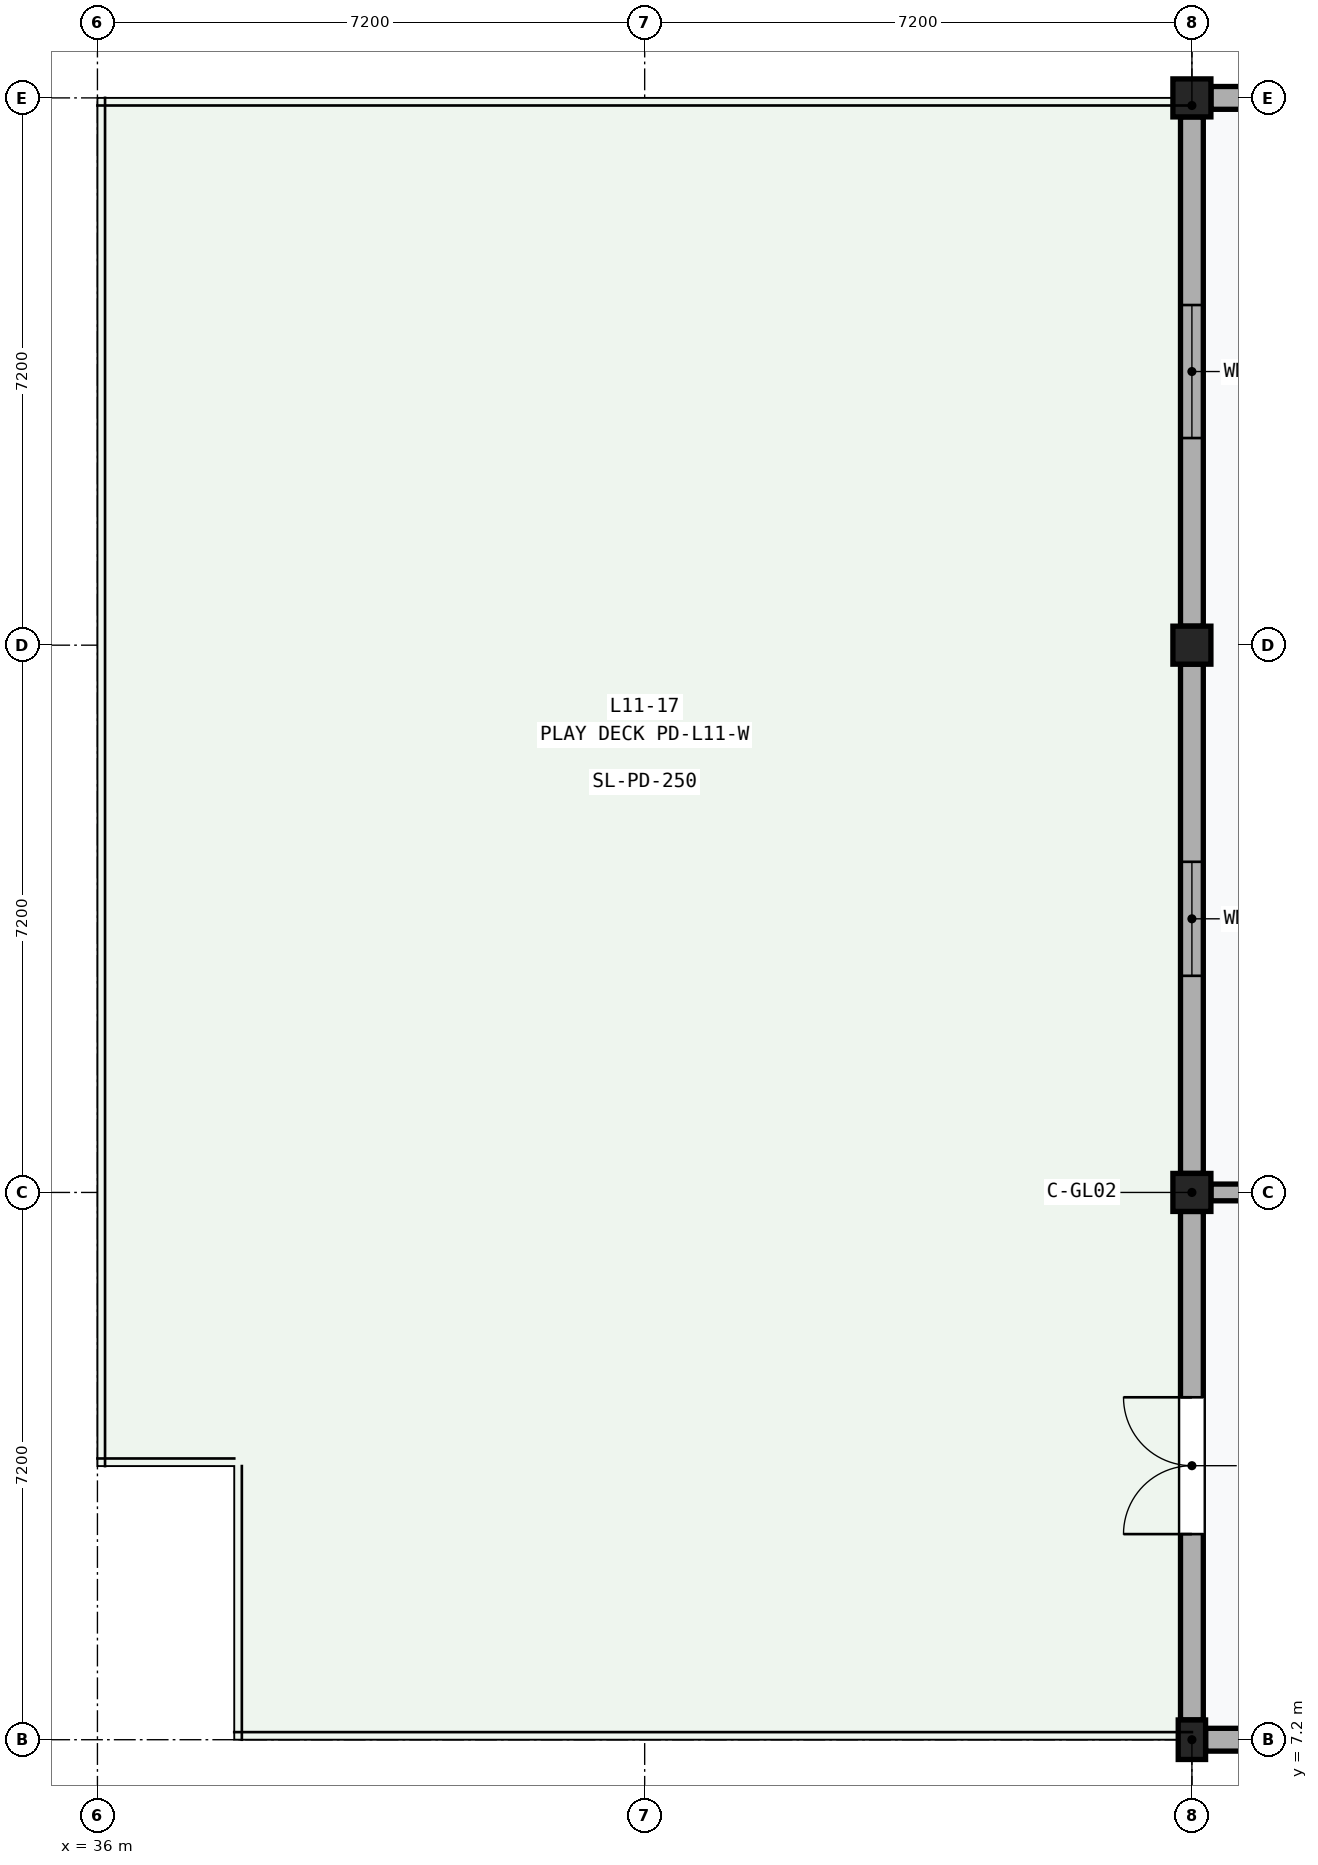
"""IFC4 building model, lengths in metres.
Left out: names, types, materials, properties, quantities, classifications, styles, units other than length and angle.
Written with IfcOpenShell. Run it as: python <this file> out.ifc"""

import sys

from ifc_helpers import new_model, si_unit, direction, frame, frame_2d, origin, origin_2d, place, context, subcontext, project, spatial, rectangle, extrude, element, fill, save


model = new_model("IFC4")
c1 = context("Model", 3, precision=1e-05, world=origin(), true_north=direction((0.0, 1.0)))
c2 = subcontext(c1, "Body", "Model", "MODEL_VIEW")
j1 = project(units=[si_unit("LENGTHUNIT", "METRE"), si_unit("PLANEANGLEUNIT", "RADIAN")], contexts=[c1])
p1 = place(None, origin())
s1 = spatial("IfcSite", under=j1, at=p1, CompositionType="ELEMENT")
p2 = place(p1, origin())
s2 = spatial("IfcBuilding", under=s1, at=p2, CompositionType="ELEMENT")
p3 = place(p2, frame((0.0, 0.0, 46.8)))
s3 = spatial("IfcBuildingStorey", under=s2, at=p3, CompositionType="ELEMENT", Elevation=46.8)
p4 = place(p3, frame((50.4, 7.2, 0.0), z_axis=(0.0, 0.0, 1.0), x_axis=(1.0, 0.0, 0.0)))
e1 = element("IfcColumn", 1, at=p4, inside=s3, PredefinedType="PILASTER", context=c2, shape_type="SweptSolid", body=[
    extrude(rectangle(XDim=0.36, YDim=0.52, at=origin_2d()), origin(), (0.0, 0.0, 1.0), 4.2),
])
for number, where, z_axis, x_axis in (
    (2, (50.4, 14.4, 0.0), (0.0, 0.0, 1.0), (1.0, 0.0, 0.0)),
    (3, (50.4, 21.6, 0.0), (0.0, 0.0, 1.0), (1.0, 0.0, 0.0)),
    (4, (50.4, 28.8, 0.0), (0.0, 0.0, 1.0), (1.0, 0.0, 0.0)),
):
    element("IfcColumn", number, at=place(p3, frame(where, z_axis=z_axis, x_axis=x_axis)), inside=s3, PredefinedType="COLUMN", context=c2, shape_type="SweptSolid", body=[
        extrude(rectangle(XDim=0.5, YDim=0.5, at=origin_2d()), origin(), (0.0, 0.0, 1.0), 4.2),
    ])
p5 = place(p3, frame((50.58, 7.2, 0.0), z_axis=(0.0, 0.0, 1.0), x_axis=(1.0, 0.0, 0.0)))
e5 = element("IfcWall", 5, at=p5, inside=s3, PredefinedType="SOLIDWALL", context=c2, shape_type="SweptSolid", body=[
    extrude(rectangle(XDim=6.77, YDim=0.3, at=frame_2d((3.385, 0.0))), origin(), (0.0, 0.0, 1.0), 3.37),
])
p6 = place(p5, frame((2.135, 0.0, 1.1)))
e6 = element("IfcOpeningElement", 6, at=p6, cuts=e5, PredefinedType="OPENING", context=c2, shape_type="SweptSolid", body=[
    extrude(rectangle(XDim=2.5, YDim=1.5, at=frame_2d((1.25, 0.75))), frame((0.0, 0.162, 0.0), z_axis=(0.0, -1.0, 0.0), x_axis=(1.0, 0.0, 0.0)), (0.0, 0.0, 1.0), 0.324),
])
p7 = place(p3, frame((50.4, 7.46, 0.0), z_axis=(0.0, 0.0, 1.0), x_axis=(0.0, 1.0, 0.0)))
e7 = element("IfcWall", 7, at=p7, inside=s3, PredefinedType="SOLIDWALL", context=c2, shape_type="SweptSolid", body=[
    extrude(rectangle(XDim=6.69, YDim=0.3, at=frame_2d((3.345, 0.0))), origin(), (0.0, 0.0, 1.0), 3.37),
])
p8 = place(p7, frame((2.445, 0.0, 0.0)))
e8 = element("IfcOpeningElement", 8, at=p8, cuts=e7, PredefinedType="OPENING", context=c2, shape_type="SweptSolid", body=[
    extrude(rectangle(XDim=1.8, YDim=2.2, at=frame_2d((0.9, 1.1))), frame((0.0, 0.162, 0.0), z_axis=(0.0, -1.0, 0.0), x_axis=(1.0, 0.0, 0.0)), (0.0, 0.0, 1.0), 0.324),
])
p9 = place(p3, frame((50.4, 14.65, 0.0), z_axis=(0.0, 0.0, 1.0), x_axis=(0.0, 1.0, 0.0)))
e9 = element("IfcWall", 9, at=p9, inside=s3, PredefinedType="SOLIDWALL", context=c2, shape_type="SweptSolid", body=[
    extrude(rectangle(XDim=6.7, YDim=0.3, at=frame_2d((3.35, 0.0))), origin(), (0.0, 0.0, 1.0), 3.37),
])
p10 = place(p9, frame((2.6, 0.0, 1.2)))
e10 = element("IfcOpeningElement", 10, at=p10, cuts=e9, PredefinedType="OPENING", context=c2, shape_type="SweptSolid", body=[
    extrude(rectangle(XDim=1.5, YDim=1.35, at=frame_2d((0.75, 0.675))), frame((0.0, 0.162, 0.0), z_axis=(0.0, -1.0, 0.0), x_axis=(1.0, 0.0, 0.0)), (0.0, 0.0, 1.0), 0.324),
])
p11 = place(p3, frame((50.65, 28.8, 0.0), z_axis=(0.0, 0.0, 1.0), x_axis=(1.0, 0.0, 0.0)))
e11 = element("IfcWall", 11, at=p11, inside=s3, PredefinedType="SOLIDWALL", context=c2, shape_type="SweptSolid", body=[
    extrude(rectangle(XDim=6.77, YDim=0.3, at=frame_2d((3.385, 0.0))), origin(), (0.0, 0.0, 1.0), 3.37),
])
p12 = place(p11, frame((2.385, 0.0, 0.7)))
e12 = element("IfcOpeningElement", 12, at=p12, cuts=e11, PredefinedType="OPENING", context=c2, shape_type="SweptSolid", body=[
    extrude(rectangle(XDim=2.0, YDim=2.2, at=frame_2d((1.0, 1.1))), frame((0.0, 0.162, 0.0), z_axis=(0.0, -1.0, 0.0), x_axis=(1.0, 0.0, 0.0)), (0.0, 0.0, 1.0), 0.324),
])
p13 = place(p3, frame((50.4, 21.85, 0.0), z_axis=(0.0, 0.0, 1.0), x_axis=(0.0, 1.0, 0.0)))
e13 = element("IfcWall", 13, at=p13, inside=s3, PredefinedType="SOLIDWALL", context=c2, shape_type="SweptSolid", body=[
    extrude(rectangle(XDim=6.7, YDim=0.3, at=frame_2d((3.35, 0.0))), origin(), (0.0, 0.0, 1.0), 3.37),
])
p14 = place(p13, frame((2.475, 0.0, 1.2)))
e14 = element("IfcOpeningElement", 14, at=p14, cuts=e13, PredefinedType="OPENING", context=c2, shape_type="SweptSolid", body=[
    extrude(rectangle(XDim=1.75, YDim=1.35, at=frame_2d((0.875, 0.675))), frame((0.0, 0.162, 0.0), z_axis=(0.0, -1.0, 0.0), x_axis=(1.0, 0.0, 0.0)), (0.0, 0.0, 1.0), 0.324),
])
p15 = place(p3, frame((50.65, 14.4, 0.0), z_axis=(0.0, 0.0, 1.0), x_axis=(1.0, 0.0, 0.0)))
e15 = element("IfcWall", 15, at=p15, inside=s3, PredefinedType="PARTITIONING", context=c2, shape_type="SweptSolid", body=[
    extrude(rectangle(XDim=6.7, YDim=0.22, at=frame_2d((3.35, 0.0))), origin(), (0.0, 0.0, 1.0), 3.29),
])
p16 = place(p15, frame((2.81, 0.0, 0.0)))
e16 = element("IfcOpeningElement", 16, at=p16, cuts=e15, PredefinedType="OPENING", context=c2, shape_type="SweptSolid", body=[
    extrude(rectangle(XDim=1.08, YDim=2.18, at=frame_2d((0.54, 1.09))), frame((0.0, 0.122, 0.0), z_axis=(0.0, -1.0, 0.0), x_axis=(1.0, 0.0, 0.0)), (0.0, 0.0, 1.0), 0.244),
])
p17 = place(p8, origin())
e17 = element("IfcDoor", 17, at=p17, inside=s3, OperationType="DOUBLE_DOOR_SINGLE_SWING", PredefinedType="DOOR", context=c2, shape_type="SweptSolid", body=[
    extrude(rectangle(XDim=1.8, YDim=2.2, at=frame_2d((0.9, 1.1))), frame((0.0, 0.025, 0.0), z_axis=(0.0, -1.0, 0.0), x_axis=(1.0, 0.0, 0.0)), (0.0, 0.0, 1.0), 0.05),
])
fill(e8, e17)
p18 = place(p10, origin())
e18 = element("IfcWindow", 18, at=p18, inside=s3, PartitioningType="SINGLE_PANEL", PredefinedType="WINDOW", context=c2, shape_type="SweptSolid", body=[
    extrude(rectangle(XDim=1.5, YDim=1.35, at=frame_2d((0.75, 0.675))), frame((0.0, 0.03, 0.0), z_axis=(0.0, -1.0, 0.0), x_axis=(1.0, 0.0, 0.0)), (0.0, 0.0, 1.0), 0.06),
])
fill(e10, e18)
p19 = place(p14, origin())
e19 = element("IfcWindow", 19, at=p19, inside=s3, PartitioningType="SINGLE_PANEL", PredefinedType="WINDOW", context=c2, shape_type="SweptSolid", body=[
    extrude(rectangle(XDim=1.75, YDim=1.35, at=frame_2d((0.875, 0.675))), frame((0.0, 0.03, 0.0), z_axis=(0.0, -1.0, 0.0), x_axis=(1.0, 0.0, 0.0)), (0.0, 0.0, 1.0), 0.06),
])
fill(e14, e19)
save(model, sys.argv[1])
